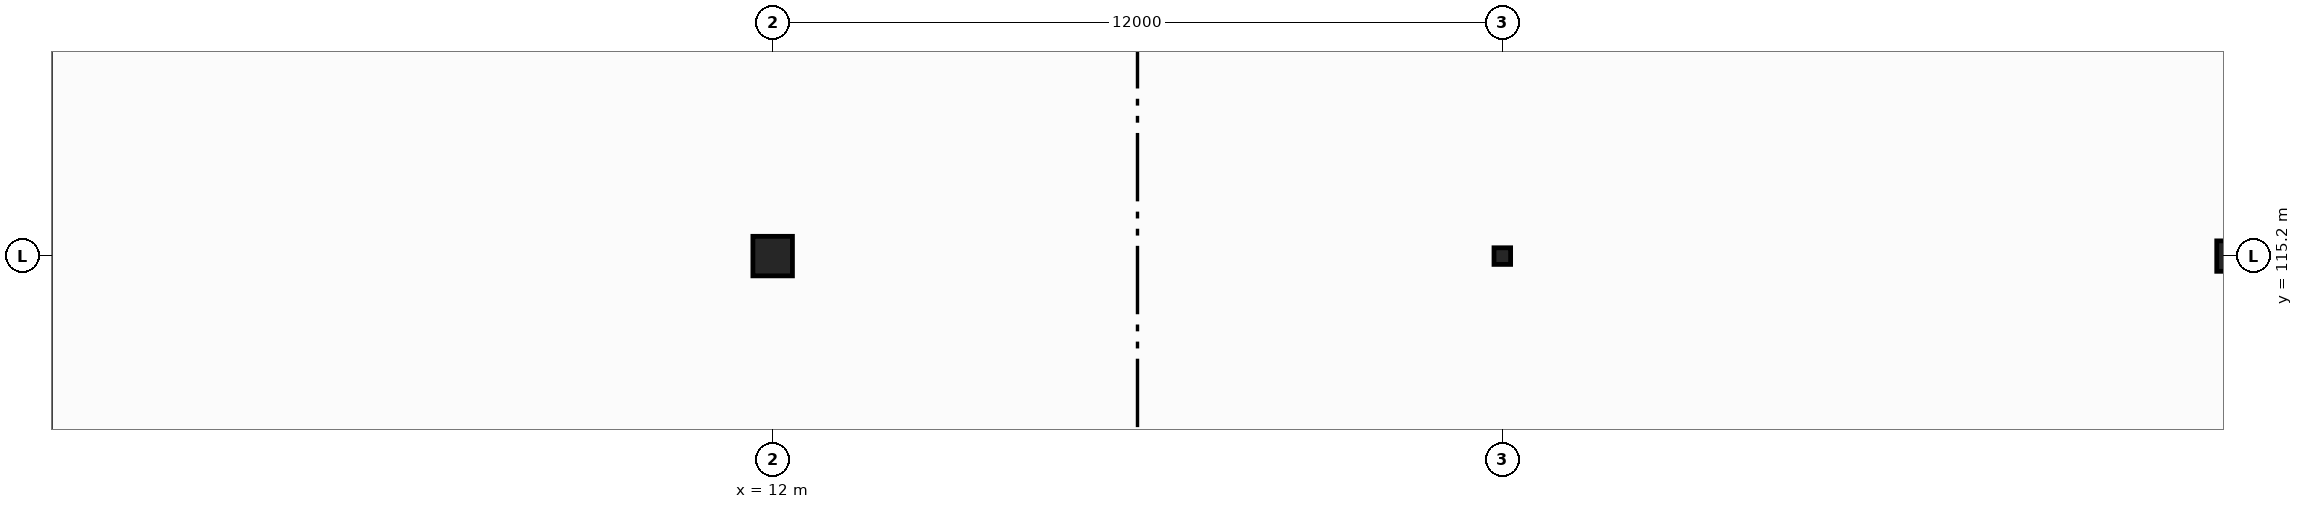
"""IFC4 building model, lengths in metres.
Left out: names, types, materials, properties, quantities, classifications, styles, units other than length and angle.
Written with IfcOpenShell. Run it as: python <this file> out.ifc"""

import sys

from ifc_helpers import new_model, si_unit, direction, frame, origin, origin_2d, place, context, subcontext, project, spatial, rectangle, hollow_circle, i_section, extrude, element, save


model = new_model("IFC4")
c1 = context("Model", 3, precision=1e-05, world=origin(), true_north=direction((0.0, 1.0)))
c2 = subcontext(c1, "Body", "Model", "MODEL_VIEW")
j1 = project(units=[si_unit("LENGTHUNIT", "METRE"), si_unit("PLANEANGLEUNIT", "RADIAN")], contexts=[c1])
p1 = place(None, origin())
s1 = spatial("IfcSite", under=j1, at=p1, CompositionType="ELEMENT")
p2 = place(p1, origin())
s2 = spatial("IfcBuilding", under=s1, at=p2, CompositionType="ELEMENT")
p3 = place(p2, frame((0.0, 0.0, -4.8)))
s3 = spatial("IfcBuildingStorey", under=s2, at=p3, CompositionType="ELEMENT", Elevation=-4.8)
p4 = place(p3, frame((12.0, 115.2, 0.0), z_axis=(0.0, 0.0, 1.0), x_axis=(0.0, 1.0, 0.0)))
e1 = element("IfcColumn", 1, at=p4, inside=s3, PredefinedType="COLUMN", context=c2, shape_type="SweptSolid", body=[
    extrude(rectangle(XDim=0.65, YDim=0.65, at=origin_2d()), origin(), (0.0, 0.0, 1.0), 4.8),
])
p5 = place(p3, frame((24.0, 115.2, 0.0), z_axis=(0.0, 0.0, 1.0), x_axis=(1.0, 0.0, 0.0)))
e2 = element("IfcColumn", 2, at=p5, inside=s3, PredefinedType="COLUMN", context=c2, shape_type="SweptSolid", body=[
    extrude(hollow_circle(Radius=0.136, WallThickness=0.013, at=origin_2d()), origin(), (0.0, 0.0, 1.0), 4.8),
])
p6 = place(p3, frame((36.0, 115.2, 0.0), z_axis=(0.0, 0.0, 1.0), x_axis=(0.0, 1.0, 0.0)))
e3 = element("IfcColumn", 3, at=p6, inside=s3, PredefinedType="COLUMN", context=c2, shape_type="SweptSolid", body=[
    extrude(i_section(OverallWidth=0.5, OverallDepth=0.5, WebThickness=0.022, FlangeThickness=0.036, at=origin_2d()), origin(), (0.0, 0.0, 1.0), 4.8),
])
save(model, sys.argv[1])
